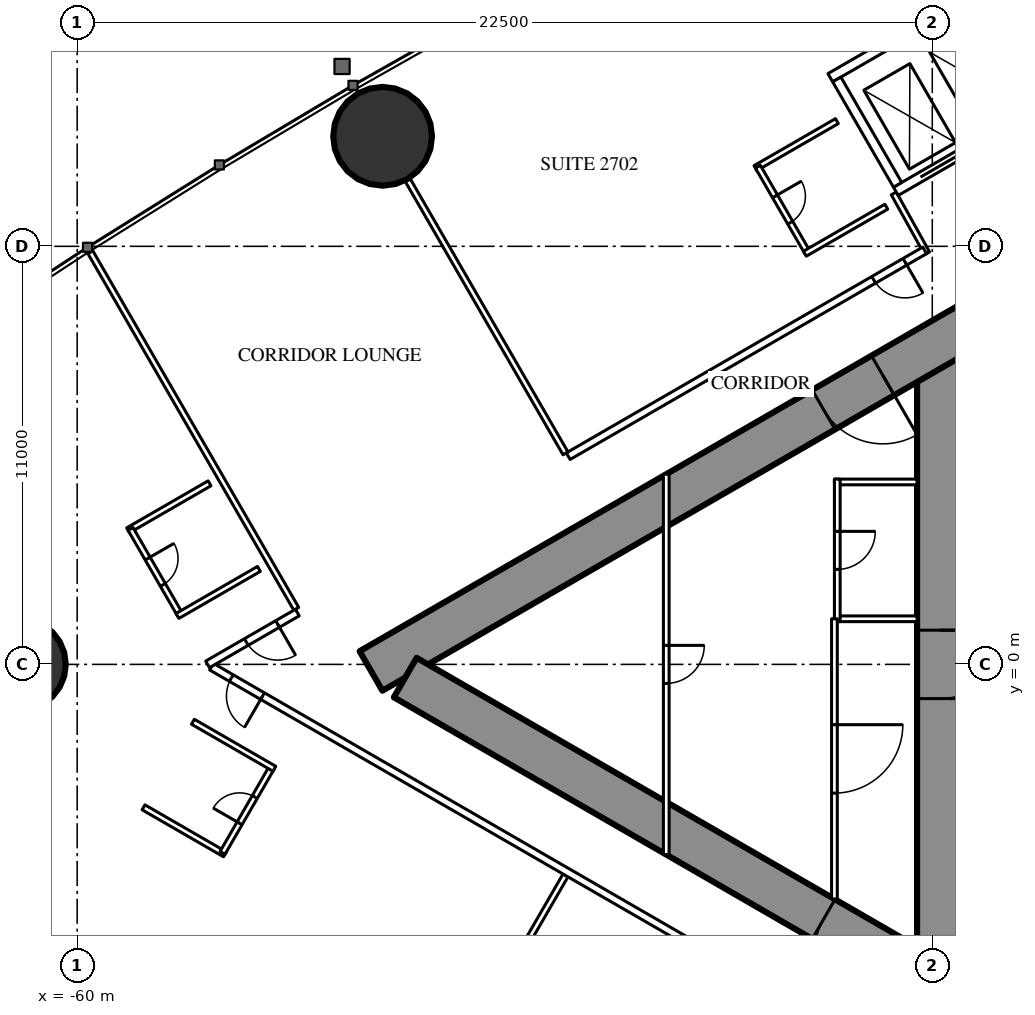
"""IFC4 building model, lengths in metres.
Left out: names, types, materials, properties, quantities, classifications, styles, units other than length and angle.
Written with IfcOpenShell. Run it as: python <this file> out.ifc"""

import sys

from ifc_helpers import new_model, si_unit, direction, frame, frame_2d, origin, origin_2d, place, context, subcontext, project, spatial, rectangle, circle, hollow_circle, extrude, element, fill, save


model = new_model("IFC4")
c1 = context("Model", 3, precision=1e-05, world=origin(), true_north=direction((0.0, 1.0)))
c2 = subcontext(c1, "Body", "Model", "MODEL_VIEW")
j1 = project(units=[si_unit("LENGTHUNIT", "METRE"), si_unit("PLANEANGLEUNIT", "RADIAN")], contexts=[c1])
p1 = place(None, origin())
s1 = spatial("IfcSite", under=j1, at=p1, CompositionType="ELEMENT")
p2 = place(p1, origin())
s2 = spatial("IfcBuilding", under=s1, at=p2, CompositionType="ELEMENT")
p3 = place(p2, frame((0.0, 0.0, 104.6)))
s3 = spatial("IfcBuildingStorey", under=s2, at=p3, CompositionType="ELEMENT", Elevation=104.6)
p4 = place(p3, frame((-51.963, 13.895, 0.0), z_axis=(0.0, 0.0, 1.0), x_axis=(1.0, 0.0, 0.0)))
e1 = element("IfcColumn", 1, at=p4, inside=s3, PredefinedType="COLUMN", context=c2, shape_type="SweptSolid", body=[
    extrude(hollow_circle(Radius=1.3, WallThickness=0.1, at=origin_2d()), origin(), (0.0, 0.0, 1.0), 3.5),
])
p5 = place(p3, frame((-61.5, 0.0, 0.0), z_axis=(0.0, 0.0, 1.0), x_axis=(1.0, 0.0, 0.0)))
e2 = element("IfcColumn", 2, at=p5, inside=s3, PredefinedType="COLUMN", context=c2, shape_type="SweptSolid", body=[
    extrude(circle(Radius=1.2, at=origin_2d()), origin(), (0.0, 0.0, 1.0), 3.5),
])
p6 = place(p3, frame((-37.3, 8.6, 0.0), z_axis=(0.0, 0.0, 1.0), x_axis=(0.0, -1.0, 0.0)))
e3 = element("IfcWall", 3, at=p6, inside=s3, PredefinedType="SHEAR", context=c2, shape_type="SweptSolid", body=[
    extrude(rectangle(XDim=17.2, YDim=1.2, at=frame_2d((8.6, 0.0))), origin(), (0.0, 0.0, 1.0), 3.5),
])
p7 = place(p6, frame((7.7, 0.0, 0.0)))
e4 = element("IfcOpeningElement", 4, at=p7, cuts=e3, PredefinedType="OPENING", context=c2, shape_type="SweptSolid", body=[
    extrude(rectangle(XDim=1.8, YDim=2.2, at=frame_2d((0.9, 1.1))), frame((0.0, 0.61, 0.0), z_axis=(0.0, -1.0, 0.0), x_axis=(1.0, 0.0, 0.0)), (0.0, 0.0, 1.0), 1.22),
])
p8 = place(p3, frame((-27.2, 14.3, 0.0), z_axis=(0.0, 0.0, 1.0), x_axis=(-0.866026593062, -0.499997940104, 0.0)))
e5 = element("IfcWall", 5, at=p8, inside=s3, PredefinedType="SHEAR", context=c2, shape_type="SweptSolid", body=[
    extrude(rectangle(XDim=28.946, YDim=1.2, at=frame_2d((14.473, 0.0))), origin(), (0.0, 0.0, 1.0), 3.5),
])
p9 = place(p8, frame((4.6, 0.0, 0.0)))
e6 = element("IfcOpeningElement", 6, at=p9, cuts=e5, PredefinedType="OPENING", context=c2, shape_type="SweptSolid", body=[
    extrude(rectangle(XDim=1.0, YDim=2.2, at=frame_2d((0.5, 1.1))), frame((0.0, 0.61, 0.0), z_axis=(0.0, -1.0, 0.0), x_axis=(1.0, 0.0, 0.0)), (0.0, 0.0, 1.0), 1.22),
])
p10 = place(p8, frame((13.395, 0.0, 0.0)))
e7 = element("IfcOpeningElement", 7, at=p10, cuts=e5, PredefinedType="OPENING", context=c2, shape_type="SweptSolid", body=[
    extrude(rectangle(XDim=1.8, YDim=2.2, at=frame_2d((0.9, 1.1))), frame((0.0, 0.61, 0.0), z_axis=(0.0, -1.0, 0.0), x_axis=(1.0, 0.0, 0.0)), (0.0, 0.0, 1.0), 1.22),
])
p11 = place(p3, frame((-27.2, -14.3, 0.0), z_axis=(0.0, 0.0, 1.0), x_axis=(-0.866024021859, 0.500002393557, 0.0)))
e8 = element("IfcWall", 8, at=p11, inside=s3, PredefinedType="SHEAR", context=c2, shape_type="SweptSolid", body=[
    extrude(rectangle(XDim=27.907, YDim=1.2, at=frame_2d((13.954, 0.0))), origin(), (0.0, 0.0, 1.0), 3.5),
])
p12 = place(p11, frame((4.6, 0.0, 0.0)))
e9 = element("IfcOpeningElement", 9, at=p12, cuts=e8, PredefinedType="OPENING", context=c2, shape_type="SweptSolid", body=[
    extrude(rectangle(XDim=1.0, YDim=2.2, at=frame_2d((0.5, 1.1))), frame((0.0, 0.61, 0.0), z_axis=(0.0, -1.0, 0.0), x_axis=(1.0, 0.0, 0.0)), (0.0, 0.0, 1.0), 1.22),
])
p13 = place(p11, frame((13.395, 0.0, 0.0)))
e10 = element("IfcOpeningElement", 10, at=p13, cuts=e8, PredefinedType="OPENING", context=c2, shape_type="SweptSolid", body=[
    extrude(rectangle(XDim=1.8, YDim=2.2, at=frame_2d((0.9, 1.1))), frame((0.0, 0.61, 0.0), z_axis=(0.0, -1.0, 0.0), x_axis=(1.0, 0.0, 0.0)), (0.0, 0.0, 1.0), 1.22),
])
p14 = place(p3, frame((-47.151, 5.552, 0.0), z_axis=(0.0, 0.0, 1.0), x_axis=(-0.500003012045, 0.866023664773, 0.0)))
e11 = element("IfcWall", 11, at=p14, inside=s3, PredefinedType="PARTITIONING", context=c2, shape_type="SweptSolid", body=[
    extrude(rectangle(XDim=8.311, YDim=0.15, at=frame_2d((4.156, 0.0))), origin(), (0.0, 0.0, 1.0), 2.2),
])
p15 = place(p3, frame((-54.236, 1.462, 0.0), z_axis=(0.0, 0.0, 1.0), x_axis=(-0.499990351854, 0.866030974073, 0.0)))
e12 = element("IfcWall", 12, at=p15, inside=s3, PredefinedType="PARTITIONING", context=c2, shape_type="SweptSolid", body=[
    extrude(rectangle(XDim=10.834, YDim=0.15, at=frame_2d((5.417, 0.0))), origin(), (0.0, 0.0, 1.0), 3.25),
])
p16 = place(p3, frame((-47.151, -5.552, 0.0), z_axis=(0.0, 0.0, 1.0), x_axis=(-0.500003012045, -0.866023664773, 0.0)))
e13 = element("IfcWall", 13, at=p16, inside=s3, PredefinedType="PARTITIONING", context=c2, shape_type="SweptSolid", body=[
    extrude(rectangle(XDim=8.311, YDim=0.15, at=frame_2d((4.156, 0.0))), origin(), (0.0, 0.0, 1.0), 2.2),
])
p17 = place(p3, frame((-36.92, -11.344, 0.0), z_axis=(0.0, 0.0, 1.0), x_axis=(-0.866028313256, 0.499994960614, 0.0)))
e14 = element("IfcWall", 14, at=p17, inside=s3, PredefinedType="PARTITIONING", context=c2, shape_type="SweptSolid", body=[
    extrude(rectangle(XDim=22.568, YDim=0.2, at=frame_2d((11.284, 0.0))), origin(), (0.0, 0.0, 1.0), 3.25),
])
p18 = place(p17, frame((21.018, 0.0, 0.0)))
e15 = element("IfcOpeningElement", 15, at=p18, cuts=e14, PredefinedType="OPENING", context=c2, shape_type="SweptSolid", body=[
    extrude(rectangle(XDim=0.95, YDim=2.2, at=frame_2d((0.475, 1.1))), frame((0.0, 0.11, 0.0), z_axis=(0.0, -1.0, 0.0), x_axis=(1.0, 0.0, 0.0)), (0.0, 0.0, 1.0), 0.22),
])
p19 = place(p17, frame((3.35, 0.0, 0.0)))
e16 = element("IfcOpeningElement", 16, at=p19, cuts=e14, PredefinedType="OPENING", context=c2, shape_type="SweptSolid", body=[
    extrude(rectangle(XDim=1.0, YDim=2.2, at=frame_2d((0.5, 1.1))), frame((0.0, 0.11, 0.0), z_axis=(0.0, -1.0, 0.0), x_axis=(1.0, 0.0, 0.0)), (0.0, 0.0, 1.0), 0.22),
])
p20 = place(p3, frame((-38.513, 12.392, 0.0), z_axis=(0.0, 0.0, 1.0), x_axis=(0.485585508183, -0.874189175317, 0.0)))
e17 = element("IfcWall", 17, at=p20, inside=s3, PredefinedType="PARTITIONING", context=c2, shape_type="SweptSolid", body=[
    extrude(rectangle(XDim=1.805, YDim=0.15, at=frame_2d((0.902, 0.0))), origin(), (0.0, 0.0, 1.0), 3.25),
])
p21 = place(p3, frame((-37.7, 10.894, 0.0), z_axis=(0.0, 0.0, 1.0), x_axis=(-0.866027551079, -0.499996280759, 0.0)))
e18 = element("IfcWall", 18, at=p21, inside=s3, PredefinedType="PARTITIONING", context=c2, shape_type="SweptSolid", body=[
    extrude(rectangle(XDim=10.831, YDim=0.2, at=frame_2d((5.415, 0.0))), origin(), (0.0, 0.0, 1.0), 3.25),
])
p22 = place(p21, frame((0.6, 0.0, 0.0)))
e19 = element("IfcOpeningElement", 19, at=p22, cuts=e18, PredefinedType="OPENING", context=c2, shape_type="SweptSolid", body=[
    extrude(rectangle(XDim=0.95, YDim=2.2, at=frame_2d((0.475, 1.1))), frame((0.0, 0.11, 0.0), z_axis=(0.0, -1.0, 0.0), x_axis=(1.0, 0.0, 0.0)), (0.0, 0.0, 1.0), 0.22),
])
p23 = place(p3, frame((-54.207, 1.363, 0.0), z_axis=(0.0, 0.0, 1.0), x_axis=(-0.866046902845, -0.499962760685, 0.0)))
e20 = element("IfcWall", 20, at=p23, inside=s3, PredefinedType="PARTITIONING", context=c2, shape_type="SweptSolid", body=[
    extrude(rectangle(XDim=2.726, YDim=0.2, at=frame_2d((1.363, 0.0))), origin(), (0.0, 0.0, 1.0), 3.25),
])
p24 = place(p23, frame((0.6, 0.0, 0.0)))
e21 = element("IfcOpeningElement", 21, at=p24, cuts=e20, PredefinedType="OPENING", context=c2, shape_type="SweptSolid", body=[
    extrude(rectangle(XDim=0.95, YDim=2.2, at=frame_2d((0.475, 1.1))), frame((0.0, 0.11, 0.0), z_axis=(0.0, -1.0, 0.0), x_axis=(1.0, 0.0, 0.0)), (0.0, 0.0, 1.0), 0.22),
])
p25 = place(p3, frame((-56.517, 4.764, 0.0), z_axis=(0.0, 0.0, 1.0), x_axis=(-0.866031185235, -0.4999899861, 0.0)))
e22 = element("IfcWall", 22, at=p25, inside=s3, PredefinedType="PARTITIONING", context=c2, shape_type="SweptSolid", body=[
    extrude(rectangle(XDim=2.475, YDim=0.15, at=frame_2d((1.238, 0.0))), origin(), (0.0, 0.0, 1.0), 3.25),
])
p26 = place(p3, frame((-57.296, 1.312, 0.0), z_axis=(0.0, 0.0, 1.0), x_axis=(-0.49997716683, 0.86603858612, 0.0)))
e23 = element("IfcWall", 23, at=p26, inside=s3, PredefinedType="PARTITIONING", context=c2, shape_type="SweptSolid", body=[
    extrude(rectangle(XDim=2.6, YDim=0.15, at=frame_2d((1.3, 0.0))), origin(), (0.0, 0.0, 1.0), 3.25),
])
p27 = place(p26, frame((0.9, 0.0, 0.0)))
e24 = element("IfcOpeningElement", 24, at=p27, cuts=e23, PredefinedType="OPENING", context=c2, shape_type="SweptSolid", body=[
    extrude(rectangle(XDim=0.8, YDim=2.2, at=frame_2d((0.4, 1.1))), frame((0.0, 0.085, 0.0), z_axis=(0.0, -1.0, 0.0), x_axis=(1.0, 0.0, 0.0)), (0.0, 0.0, 1.0), 0.17),
])
for number, where, z_axis, x_axis in (
    (25, (-55.217, 2.512, 0.0), (0.0, 0.0, 1.0), (-0.866, -0.5, 0.0)),
    (26, (-56.111, -4.998, 0.0), (0.0, 0.0, 1.0), (-0.866, 0.5, 0.0)),
):
    element("IfcWall", number, at=place(p3, frame(where, z_axis=z_axis, x_axis=x_axis)), inside=s3, PredefinedType="PARTITIONING", context=c2, shape_type="SweptSolid", body=[
        extrude(rectangle(XDim=2.475, YDim=0.15, at=frame_2d((1.238, 0.0))), origin(), (0.0, 0.0, 1.0), 3.25),
    ])
p28 = place(p3, frame((-54.876, -2.709, 0.0), z_axis=(0.0, 0.0, 1.0), x_axis=(-0.500006934395, -0.866021400173, 0.0)))
e27 = element("IfcWall", 27, at=p28, inside=s3, PredefinedType="PARTITIONING", context=c2, shape_type="SweptSolid", body=[
    extrude(rectangle(XDim=2.6, YDim=0.15, at=frame_2d((1.3, 0.0))), origin(), (0.0, 0.0, 1.0), 3.25),
])
p29 = place(p28, frame((0.9, 0.0, 0.0)))
e28 = element("IfcOpeningElement", 28, at=p29, cuts=e27, PredefinedType="OPENING", context=c2, shape_type="SweptSolid", body=[
    extrude(rectangle(XDim=0.8, YDim=2.2, at=frame_2d((0.4, 1.1))), frame((0.0, 0.085, 0.0), z_axis=(0.0, -1.0, 0.0), x_axis=(1.0, 0.0, 0.0)), (0.0, 0.0, 1.0), 0.17),
])
for number, where, z_axis, x_axis in (
    (29, (-54.811, -2.747, 0.0), (0.0, 0.0, 1.0), (-0.866, 0.5, 0.0)),
    (30, (-40.01, 14.294, 0.0), (0.0, 0.0, 1.0), (-0.866, -0.5, 0.0)),
):
    element("IfcWall", number, at=place(p3, frame(where, z_axis=z_axis, x_axis=x_axis)), inside=s3, PredefinedType="PARTITIONING", context=c2, shape_type="SweptSolid", body=[
        extrude(rectangle(XDim=2.475, YDim=0.15, at=frame_2d((1.238, 0.0))), origin(), (0.0, 0.0, 1.0), 3.25),
    ])
p30 = place(p3, frame((-40.788, 10.843, 0.0), z_axis=(0.0, 0.0, 1.0), x_axis=(-0.500006934395, 0.866021400173, 0.0)))
e31 = element("IfcWall", 31, at=p30, inside=s3, PredefinedType="PARTITIONING", context=c2, shape_type="SweptSolid", body=[
    extrude(rectangle(XDim=2.6, YDim=0.15, at=frame_2d((1.3, 0.0))), origin(), (0.0, 0.0, 1.0), 3.25),
])
p31 = place(p30, frame((0.9, 0.0, 0.0)))
e32 = element("IfcOpeningElement", 32, at=p31, cuts=e31, PredefinedType="OPENING", context=c2, shape_type="SweptSolid", body=[
    extrude(rectangle(XDim=0.8, YDim=2.2, at=frame_2d((0.4, 1.1))), frame((0.0, 0.085, 0.0), z_axis=(0.0, -1.0, 0.0), x_axis=(1.0, 0.0, 0.0)), (0.0, 0.0, 1.0), 0.17),
])
p32 = place(p3, frame((-38.71, 12.042, 0.0), z_axis=(0.0, 0.0, 1.0), x_axis=(-0.86604923931, -0.499958713387, 0.0)))
e33 = element("IfcWall", 33, at=p32, inside=s3, PredefinedType="PARTITIONING", context=c2, shape_type="SweptSolid", body=[
    extrude(rectangle(XDim=2.475, YDim=0.15, at=frame_2d((1.237, 0.0))), origin(), (0.0, 0.0, 1.0), 3.25),
])
for number, where, z_axis, x_axis in (
    (34, (-37.9, 1.2, 0.0), (0.0, 0.0, 1.0), (-1.0, 0.0, 0.0)),
    (35, (-37.9, 4.8, 0.0), (0.0, 0.0, 1.0), (-1.0, 0.0, 0.0)),
):
    element("IfcWall", number, at=place(p3, frame(where, z_axis=z_axis, x_axis=x_axis)), inside=s3, PredefinedType="PARTITIONING", context=c2, shape_type="SweptSolid", body=[
        extrude(rectangle(XDim=2.175, YDim=0.15, at=frame_2d((1.087, 0.0))), origin(), (0.0, 0.0, 1.0), 3.25),
    ])
p33 = place(p3, frame((-40.0, 4.875, 0.0), z_axis=(0.0, 0.0, 1.0), x_axis=(0.0, -1.0, 0.0)))
e36 = element("IfcWall", 36, at=p33, inside=s3, PredefinedType="PARTITIONING", context=c2, shape_type="SweptSolid", body=[
    extrude(rectangle(XDim=3.75, YDim=0.15, at=frame_2d((1.875, 0.0))), origin(), (0.0, 0.0, 1.0), 3.25),
])
p34 = place(p33, frame((1.375, 0.0, 0.0)))
e37 = element("IfcOpeningElement", 37, at=p34, cuts=e36, PredefinedType="OPENING", context=c2, shape_type="SweptSolid", body=[
    extrude(rectangle(XDim=1.0, YDim=2.2, at=frame_2d((0.5, 1.1))), frame((0.0, 0.085, 0.0), z_axis=(0.0, -1.0, 0.0), x_axis=(1.0, 0.0, 0.0)), (0.0, 0.0, 1.0), 0.17),
])
p35 = place(p3, frame((-40.075, 1.2, 0.0), z_axis=(0.0, 0.0, 1.0), x_axis=(0.0, -1.0, 0.0)))
e38 = element("IfcWall", 38, at=p35, inside=s3, PredefinedType="PARTITIONING", context=c2, shape_type="SweptSolid", body=[
    extrude(rectangle(XDim=7.374, YDim=0.15, at=frame_2d((3.687, 0.0))), origin(), (0.0, 0.0, 1.0), 3.25),
])
p36 = place(p35, frame((2.787, 0.0, 0.0)))
e39 = element("IfcOpeningElement", 39, at=p36, cuts=e38, PredefinedType="OPENING", context=c2, shape_type="SweptSolid", body=[
    extrude(rectangle(XDim=1.8, YDim=2.2, at=frame_2d((0.9, 1.1))), frame((0.0, 0.085, 0.0), z_axis=(0.0, -1.0, 0.0), x_axis=(1.0, 0.0, 0.0)), (0.0, 0.0, 1.0), 0.17),
])
p37 = place(p3, frame((-44.5, 5.005, 0.0), z_axis=(0.0, 0.0, 1.0), x_axis=(0.0, -1.0, 0.0)))
e40 = element("IfcWall", 40, at=p37, inside=s3, PredefinedType="PARTITIONING", context=c2, shape_type="SweptSolid", body=[
    extrude(rectangle(XDim=10.009, YDim=0.15, at=frame_2d((5.005, 0.0))), origin(), (0.0, 0.0, 1.0), 2.45),
])
p38 = place(p37, frame((4.505, 0.0, 0.0)))
e41 = element("IfcOpeningElement", 41, at=p38, cuts=e40, PredefinedType="OPENING", context=c2, shape_type="SweptSolid", body=[
    extrude(rectangle(XDim=1.0, YDim=2.2, at=frame_2d((0.5, 1.1))), frame((0.0, 0.085, 0.0), z_axis=(0.0, -1.0, 0.0), x_axis=(1.0, 0.0, 0.0)), (0.0, 0.0, 1.0), 0.17),
])
p39 = place(p3, frame((-31.01, 16.747, 0.0), z_axis=(0.0, 0.0, 1.0), x_axis=(-0.866028165386, -0.499995216735, 0.0)))
e42 = element("IfcWall", 42, at=p39, inside=s3, PredefinedType="PARTITIONING", context=c2, shape_type="SweptSolid", body=[
    extrude(rectangle(XDim=8.6, YDim=0.25, at=frame_2d((4.3, 0.0))), origin(), (0.0, 0.0, 1.0), 3.25),
])
p40 = place(p39, frame((0.75, 0.0, 0.0)))
e43 = element("IfcOpeningElement", 43, at=p40, cuts=e42, PredefinedType="OPENING", context=c2, shape_type="SweptSolid", body=[
    extrude(rectangle(XDim=1.1, YDim=2.2, at=frame_2d((0.55, 1.1))), frame((0.0, 0.135, 0.0), z_axis=(0.0, -1.0, 0.0), x_axis=(1.0, 0.0, 0.0)), (0.0, 0.0, 1.0), 0.27),
])
p41 = place(p39, frame((2.75, 0.0, 0.0)))
e44 = element("IfcOpeningElement", 44, at=p41, cuts=e42, PredefinedType="OPENING", context=c2, shape_type="SweptSolid", body=[
    extrude(rectangle(XDim=1.1, YDim=2.2, at=frame_2d((0.55, 1.1))), frame((0.0, 0.135, 0.0), z_axis=(0.0, -1.0, 0.0), x_axis=(1.0, 0.0, 0.0)), (0.0, 0.0, 1.0), 0.27),
])
p42 = place(p39, frame((4.75, 0.0, 0.0)))
e45 = element("IfcOpeningElement", 45, at=p42, cuts=e42, PredefinedType="OPENING", context=c2, shape_type="SweptSolid", body=[
    extrude(rectangle(XDim=1.1, YDim=2.2, at=frame_2d((0.55, 1.1))), frame((0.0, 0.135, 0.0), z_axis=(0.0, -1.0, 0.0), x_axis=(1.0, 0.0, 0.0)), (0.0, 0.0, 1.0), 0.27),
])
p43 = place(p39, frame((6.75, 0.0, 0.0)))
e46 = element("IfcOpeningElement", 46, at=p43, cuts=e42, PredefinedType="OPENING", context=c2, shape_type="SweptSolid", body=[
    extrude(rectangle(XDim=1.1, YDim=2.2, at=frame_2d((0.55, 1.1))), frame((0.0, 0.135, 0.0), z_axis=(0.0, -1.0, 0.0), x_axis=(1.0, 0.0, 0.0)), (0.0, 0.0, 1.0), 0.27),
])
p44 = place(p3, frame((-32.736, 19.736, 0.0), z_axis=(0.0, 0.0, 1.0), x_axis=(-0.866028165386, -0.499995216735, 0.0)))
e47 = element("IfcWall", 47, at=p44, inside=s3, PredefinedType="PARTITIONING", context=c2, shape_type="SweptSolid", body=[
    extrude(rectangle(XDim=8.6, YDim=0.25, at=frame_2d((4.3, 0.0))), origin(), (0.0, 0.0, 1.0), 3.25),
])
p45 = place(p3, frame((-38.413, 12.618, 0.0), z_axis=(0.0, 0.0, 1.0), x_axis=(-0.499872130319, 0.866099216793, 0.0)))
e48 = element("IfcWall", 48, at=p45, inside=s3, PredefinedType="PARTITIONING", context=c2, shape_type="SweptSolid", body=[
    extrude(rectangle(XDim=3.2, YDim=0.25, at=frame_2d((1.6, 0.0))), origin(), (0.0, 0.0, 1.0), 3.25),
])
p46 = place(p27, origin())
e49 = element("IfcDoor", 49, at=p46, inside=s3, OperationType="SINGLE_SWING_RIGHT", PredefinedType="DOOR", context=c2, shape_type="SweptSolid", body=[
    extrude(rectangle(XDim=0.8, YDim=2.2, at=frame_2d((0.4, 1.1))), frame((0.0, 0.025, 0.0), z_axis=(0.0, -1.0, 0.0), x_axis=(1.0, 0.0, 0.0)), (0.0, 0.0, 1.0), 0.05),
])
fill(e24, e49)
p47 = place(p24, origin())
e50 = element("IfcDoor", 50, at=p47, inside=s3, OperationType="SINGLE_SWING_LEFT", PredefinedType="DOOR", context=c2, shape_type="SweptSolid", body=[
    extrude(rectangle(XDim=0.95, YDim=2.2, at=frame_2d((0.475, 1.1))), frame((0.0, 0.025, 0.0), z_axis=(0.0, -1.0, 0.0), x_axis=(1.0, 0.0, 0.0)), (0.0, 0.0, 1.0), 0.05),
])
fill(e21, e50)
p48 = place(p29, origin())
e51 = element("IfcDoor", 51, at=p48, inside=s3, OperationType="SINGLE_SWING_RIGHT", PredefinedType="DOOR", context=c2, shape_type="SweptSolid", body=[
    extrude(rectangle(XDim=0.8, YDim=2.2, at=frame_2d((0.4, 1.1))), frame((0.0, 0.025, 0.0), z_axis=(0.0, -1.0, 0.0), x_axis=(1.0, 0.0, 0.0)), (0.0, 0.0, 1.0), 0.05),
])
fill(e28, e51)
p49 = place(p18, origin())
e52 = element("IfcDoor", 52, at=p49, inside=s3, OperationType="SINGLE_SWING_LEFT", PredefinedType="DOOR", context=c2, shape_type="SweptSolid", body=[
    extrude(rectangle(XDim=0.95, YDim=2.2, at=frame_2d((0.475, 1.1))), frame((0.0, 0.025, 0.0), z_axis=(0.0, -1.0, 0.0), x_axis=(1.0, 0.0, 0.0)), (0.0, 0.0, 1.0), 0.05),
])
fill(e15, e52)
p50 = place(p31, origin())
e53 = element("IfcDoor", 53, at=p50, inside=s3, OperationType="SINGLE_SWING_RIGHT", PredefinedType="DOOR", context=c2, shape_type="SweptSolid", body=[
    extrude(rectangle(XDim=0.8, YDim=2.2, at=frame_2d((0.4, 1.1))), frame((0.0, 0.025, 0.0), z_axis=(0.0, -1.0, 0.0), x_axis=(1.0, 0.0, 0.0)), (0.0, 0.0, 1.0), 0.05),
])
fill(e32, e53)
p51 = place(p22, origin())
e54 = element("IfcDoor", 54, at=p51, inside=s3, OperationType="SINGLE_SWING_LEFT", PredefinedType="DOOR", context=c2, shape_type="SweptSolid", body=[
    extrude(rectangle(XDim=0.95, YDim=2.2, at=frame_2d((0.475, 1.1))), frame((0.0, 0.025, 0.0), z_axis=(0.0, -1.0, 0.0), x_axis=(1.0, 0.0, 0.0)), (0.0, 0.0, 1.0), 0.05),
])
fill(e19, e54)
p52 = place(p34, origin())
e55 = element("IfcDoor", 55, at=p52, inside=s3, OperationType="SINGLE_SWING_LEFT", PredefinedType="DOOR", context=c2, shape_type="SweptSolid", body=[
    extrude(rectangle(XDim=1.0, YDim=2.2, at=frame_2d((0.5, 1.1))), frame((0.0, 0.025, 0.0), z_axis=(0.0, -1.0, 0.0), x_axis=(1.0, 0.0, 0.0)), (0.0, 0.0, 1.0), 0.05),
])
fill(e37, e55)
p53 = place(p36, origin())
e56 = element("IfcDoor", 56, at=p53, inside=s3, OperationType="DOUBLE_DOOR_SINGLE_SWING", PredefinedType="DOOR", context=c2, shape_type="SweptSolid", body=[
    extrude(rectangle(XDim=1.8, YDim=2.2, at=frame_2d((0.9, 1.1))), frame((0.0, 0.025, 0.0), z_axis=(0.0, -1.0, 0.0), x_axis=(1.0, 0.0, 0.0)), (0.0, 0.0, 1.0), 0.05),
])
fill(e39, e56)
p54 = place(p38, origin())
e57 = element("IfcDoor", 57, at=p54, inside=s3, OperationType="SINGLE_SWING_LEFT", PredefinedType="DOOR", context=c2, shape_type="SweptSolid", body=[
    extrude(rectangle(XDim=1.0, YDim=2.2, at=frame_2d((0.5, 1.1))), frame((0.0, 0.025, 0.0), z_axis=(0.0, -1.0, 0.0), x_axis=(1.0, 0.0, 0.0)), (0.0, 0.0, 1.0), 0.05),
])
fill(e41, e57)
p55 = place(p10, origin())
e58 = element("IfcDoor", 58, at=p55, inside=s3, OperationType="DOUBLE_DOOR_SINGLE_SWING", PredefinedType="DOOR", context=c2, shape_type="SweptSolid", body=[
    extrude(rectangle(XDim=1.8, YDim=2.2, at=frame_2d((0.9, 1.1))), frame((0.0, 0.025, 0.0), z_axis=(0.0, -1.0, 0.0), x_axis=(1.0, 0.0, 0.0)), (0.0, 0.0, 1.0), 0.05),
])
fill(e7, e58)
p56 = place(p13, origin())
e59 = element("IfcDoor", 59, at=p56, inside=s3, OperationType="DOUBLE_DOOR_SINGLE_SWING", PredefinedType="DOOR", context=c2, shape_type="SweptSolid", body=[
    extrude(rectangle(XDim=1.8, YDim=2.2, at=frame_2d((0.9, 1.1))), frame((0.0, 0.025, 0.0), z_axis=(0.0, -1.0, 0.0), x_axis=(1.0, 0.0, 0.0)), (0.0, 0.0, 1.0), 0.05),
])
fill(e10, e59)
p57 = place(p7, origin())
e60 = element("IfcDoor", 60, at=p57, inside=s3, OperationType="DOUBLE_DOOR_SINGLE_SWING", PredefinedType="DOOR", context=c2, shape_type="SweptSolid", body=[
    extrude(rectangle(XDim=1.8, YDim=2.2, at=frame_2d((0.9, 1.1))), frame((0.0, 0.025, 0.0), z_axis=(0.0, -1.0, 0.0), x_axis=(1.0, 0.0, 0.0)), (0.0, 0.0, 1.0), 0.05),
])
fill(e4, e60)
p58 = place(p43, origin())
e61 = element("IfcDoor", 61, at=p58, inside=s3, OperationType="DOUBLE_DOOR_SLIDING", PredefinedType="USERDEFINED", context=c2, shape_type="SweptSolid", body=[
    extrude(rectangle(XDim=1.1, YDim=2.2, at=frame_2d((0.55, 1.1))), frame((0.0, 0.025, 0.0), z_axis=(0.0, -1.0, 0.0), x_axis=(1.0, 0.0, 0.0)), (0.0, 0.0, 1.0), 0.05),
])
fill(e46, e61)
save(model, sys.argv[1])
